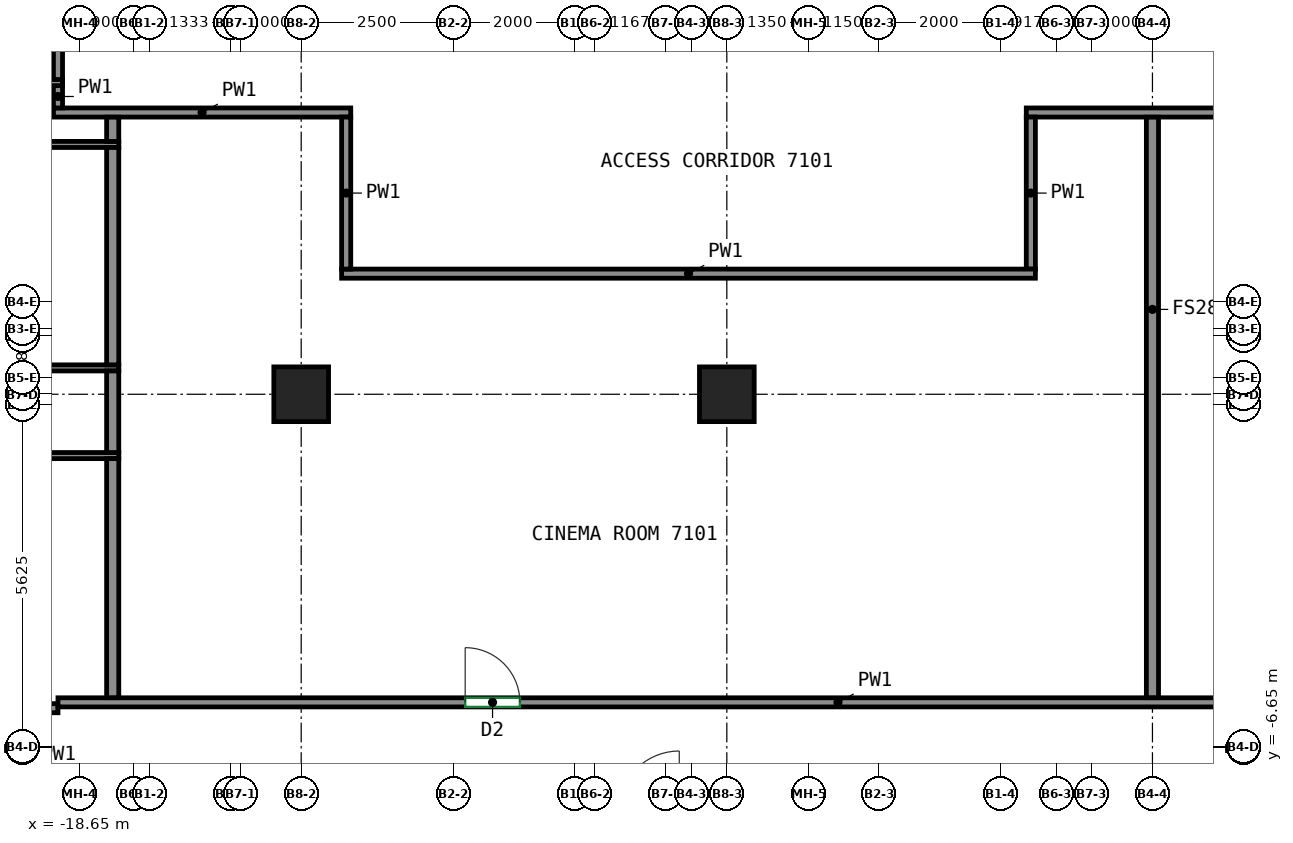
"""IFC4 building model, lengths in metres.
Left out: names, types, materials, properties, quantities, classifications, styles, units other than length and angle.
Written with IfcOpenShell. Run it as: python <this file> out.ifc"""

import sys

from ifc_helpers import new_model, si_unit, direction, frame, frame_2d, origin, origin_2d, place, context, subcontext, project, spatial, rectangle, extrude, source, transform, mapped, element, fill, save


model = new_model("IFC4")
c1 = context("Model", 3, precision=1e-05, world=origin(), true_north=direction((0.0, 1.0)))
c2 = subcontext(c1, "Body", "Model", "MODEL_VIEW")
j1 = project(units=[si_unit("LENGTHUNIT", "METRE"), si_unit("PLANEANGLEUNIT", "RADIAN")], contexts=[c1])
p1 = place(None, origin())
s1 = spatial("IfcSite", under=j1, at=p1, CompositionType="ELEMENT")
p2 = place(p1, origin())
s2 = spatial("IfcBuilding", under=s1, at=p2, CompositionType="ELEMENT")
p3 = place(p2, frame((0.0, 0.0, 287.4)))
s3 = spatial("IfcBuildingStorey", under=s2, at=p3, CompositionType="ELEMENT", Elevation=287.4)
m1 = source(origin(), c2, "Body", "SweptSolid", [
    extrude(rectangle(XDim=0.9, YDim=0.9, at=origin_2d()), origin(), (0.0, 0.0, 1.0), 3.0),
])
for number, where, z_axis, x_axis in (
    (1, (-15.0, -0.833, 0.0), (0.0, 0.0, 1.0), (1.0, 0.0, 0.0)),
    (2, (-8.0, -0.833, 0.0), (0.0, 0.0, 1.0), (1.0, 0.0, 0.0)),
):
    element("IfcColumn", number, at=place(p3, frame(where, z_axis=z_axis, x_axis=x_axis)), inside=s3, PredefinedType="COLUMN", context=c2, shape_type="MappedRepresentation", body=[
        mapped(m1, transform((0.0, 0.0, 0.0))),
    ])
p4 = place(p3, frame((-19.0, -5.996, 0.0), z_axis=(0.0, 0.0, 1.0), x_axis=(-1.0, 0.0, 0.0)))
e3 = element("IfcWall", 3, at=p4, inside=s3, PredefinedType="PARTITIONING", context=c2, shape_type="SweptSolid", body=[
    extrude(rectangle(XDim=0.677, YDim=0.15, at=frame_2d((0.338, 0.0))), origin(), (0.0, 0.0, 1.0), 3.0),
])
p5 = place(p3, frame((-19.0, -5.9, 0.0), z_axis=(0.0, 0.0, 1.0), x_axis=(1.0, 0.0, 0.0)))
e4 = element("IfcWall", 4, at=p5, inside=s3, PredefinedType="PARTITIONING", context=c2, shape_type="SweptSolid", body=[
    extrude(rectangle(XDim=25.655, YDim=0.15, at=frame_2d((12.828, 0.0))), origin(), (0.0, 0.0, 1.0), 3.0),
])
p6 = place(p5, frame((6.697, 0.0, 0.0)))
e5 = element("IfcOpeningElement", 5, at=p6, cuts=e4, PredefinedType="OPENING", context=c2, shape_type="SweptSolid", body=[
    extrude(rectangle(XDim=0.9, YDim=2.1, at=frame_2d((0.45, 1.05))), frame((0.0, 0.085, 0.0), z_axis=(0.0, -1.0, 0.0), x_axis=(1.0, 0.0, 0.0)), (0.0, 0.0, 1.0), 0.17),
])
p7 = place(p3, frame((-19.075, 3.8, 0.0), z_axis=(0.0, 0.0, 1.0), x_axis=(1.0, 0.0, 0.0)))
e6 = element("IfcWall", 6, at=p7, inside=s3, PredefinedType="PARTITIONING", context=c2, shape_type="SweptSolid", body=[
    extrude(rectangle(XDim=4.89, YDim=0.15, at=frame_2d((2.445, 0.0))), origin(), (0.0, 0.0, 1.0), 3.0),
])
p8 = place(p3, frame((-19.0, 3.875, 0.0), z_axis=(0.0, 0.0, 1.0), x_axis=(0.0, 1.0, 0.0)))
e7 = element("IfcWall", 7, at=p8, inside=s3, PredefinedType="PARTITIONING", context=c2, shape_type="SweptSolid", body=[
    extrude(rectangle(XDim=0.377, YDim=0.15, at=frame_2d((0.188, 0.0))), origin(), (0.0, 0.0, 1.0), 3.0),
])
p9 = place(p3, frame((-19.0, 4.332, 0.0), z_axis=(0.0, 0.0, 1.0), x_axis=(0.0, 1.0, 0.0)))
e8 = element("IfcWall", 8, at=p9, inside=s3, PredefinedType="PARTITIONING", context=c2, shape_type="SweptSolid", body=[
    extrude(rectangle(XDim=3.578, YDim=0.15, at=frame_2d((1.789, 0.0))), origin(), (0.0, 0.0, 1.0), 3.0),
])
p10 = place(p3, frame((-3.075, 3.8, 0.0), z_axis=(0.0, 0.0, 1.0), x_axis=(1.0, 0.0, 0.0)))
e9 = element("IfcWall", 9, at=p10, inside=s3, PredefinedType="PARTITIONING", context=c2, shape_type="SweptSolid", body=[
    extrude(rectangle(XDim=9.73, YDim=0.15, at=frame_2d((4.865, 0.0))), origin(), (0.0, 0.0, 1.0), 3.0),
])
p11 = place(p3, frame((-3.0, 1.225, 0.0), z_axis=(0.0, 0.0, 1.0), x_axis=(0.0, 1.0, 0.0)))
e10 = element("IfcWall", 10, at=p11, inside=s3, PredefinedType="PARTITIONING", context=c2, shape_type="SweptSolid", body=[
    extrude(rectangle(XDim=2.5, YDim=0.15, at=frame_2d((1.25, 0.0))), origin(), (0.0, 0.0, 1.0), 3.0),
])
p12 = place(p3, frame((-14.335, 1.15, 0.0), z_axis=(0.0, 0.0, 1.0), x_axis=(1.0, 0.0, 0.0)))
e11 = element("IfcWall", 11, at=p12, inside=s3, PredefinedType="PARTITIONING", context=c2, shape_type="SweptSolid", body=[
    extrude(rectangle(XDim=11.41, YDim=0.15, at=frame_2d((5.705, 0.0))), origin(), (0.0, 0.0, 1.0), 3.0),
])
p13 = place(p3, frame((-14.26, 3.725, 0.0), z_axis=(0.0, 0.0, 1.0), x_axis=(0.0, -1.0, 0.0)))
e12 = element("IfcWall", 12, at=p13, inside=s3, PredefinedType="PARTITIONING", context=c2, shape_type="SweptSolid", body=[
    extrude(rectangle(XDim=2.5, YDim=0.15, at=frame_2d((1.25, 0.0))), origin(), (0.0, 0.0, 1.0), 3.0),
])
p14 = place(p3, frame((-18.0, -1.842, 0.0), z_axis=(0.0, 0.0, 1.0), x_axis=(-1.0, 0.0, 0.0)))
e13 = element("IfcWall", 13, at=p14, inside=s3, PredefinedType="PARTITIONING", context=c2, shape_type="SweptSolid", body=[
    extrude(rectangle(XDim=7.25, YDim=0.1, at=frame_2d((3.625, 0.0))), origin(), (0.0, 0.0, 1.0), 3.0),
])
p15 = place(p14, frame((3.629, 0.0, 0.0)))
e14 = element("IfcOpeningElement", 14, at=p15, cuts=e13, PredefinedType="OPENING", context=c2, shape_type="SweptSolid", body=[
    extrude(rectangle(XDim=0.9, YDim=2.1, at=frame_2d((0.45, 1.05))), frame((0.0, 0.06, 0.0), z_axis=(0.0, -1.0, 0.0), x_axis=(1.0, 0.0, 0.0)), (0.0, 0.0, 1.0), 0.12),
])
p16 = place(p3, frame((-18.1, -5.823, 0.0), z_axis=(0.0, 0.0, 1.0), x_axis=(0.0, 1.0, 0.0)))
e15 = element("IfcWall", 15, at=p16, inside=s3, PredefinedType="PARTITIONING", context=c2, shape_type="SweptSolid", body=[
    extrude(rectangle(XDim=3.931, YDim=0.2, at=frame_2d((1.965, 0.0))), origin(), (0.0, 0.0, 1.0), 3.0),
])
p17 = place(p3, frame((-18.0, -0.4, 0.0), z_axis=(0.0, 0.0, 1.0), x_axis=(-1.0, 0.0, 0.0)))
e16 = element("IfcWall", 16, at=p17, inside=s3, PredefinedType="PARTITIONING", context=c2, shape_type="SweptSolid", body=[
    extrude(rectangle(XDim=7.25, YDim=0.1, at=frame_2d((3.625, 0.0))), origin(), (0.0, 0.0, 1.0), 3.0),
])
p18 = place(p17, frame((5.647, 0.0, 0.0)))
e17 = element("IfcOpeningElement", 17, at=p18, cuts=e16, PredefinedType="OPENING", context=c2, shape_type="SweptSolid", body=[
    extrude(rectangle(XDim=1.0, YDim=2.1, at=frame_2d((0.5, 1.05))), frame((0.0, 0.06, 0.0), z_axis=(0.0, -1.0, 0.0), x_axis=(1.0, 0.0, 0.0)), (0.0, 0.0, 1.0), 0.12),
])
p19 = place(p3, frame((-18.1, -1.792, 0.0), z_axis=(0.0, 0.0, 1.0), x_axis=(0.0, 1.0, 0.0)))
e18 = element("IfcWall", 18, at=p19, inside=s3, PredefinedType="PARTITIONING", context=c2, shape_type="SweptSolid", body=[
    extrude(rectangle(XDim=1.342, YDim=0.2, at=frame_2d((0.671, 0.0))), origin(), (0.0, 0.0, 1.0), 3.0),
])
p20 = place(p3, frame((-18.0, 3.275, 0.0), z_axis=(0.0, 0.0, 1.0), x_axis=(-1.0, 0.0, 0.0)))
e19 = element("IfcWall", 19, at=p20, inside=s3, PredefinedType="PARTITIONING", context=c2, shape_type="SweptSolid", body=[
    extrude(rectangle(XDim=7.25, YDim=0.1, at=frame_2d((3.625, 0.0))), origin(), (0.0, 0.0, 1.0), 3.0),
])
p21 = place(p20, frame((2.116, 0.0, 0.0)))
e20 = element("IfcOpeningElement", 20, at=p21, cuts=e19, PredefinedType="OPENING", context=c2, shape_type="SweptSolid", body=[
    extrude(rectangle(XDim=0.9, YDim=2.1, at=frame_2d((0.45, 1.05))), frame((0.0, 0.06, 0.0), z_axis=(0.0, -1.0, 0.0), x_axis=(1.0, 0.0, 0.0)), (0.0, 0.0, 1.0), 0.12),
])
p22 = place(p3, frame((-18.1, -0.35, 0.0), z_axis=(0.0, 0.0, 1.0), x_axis=(0.0, 1.0, 0.0)))
e21 = element("IfcWall", 21, at=p22, inside=s3, PredefinedType="PARTITIONING", context=c2, shape_type="SweptSolid", body=[
    extrude(rectangle(XDim=3.575, YDim=0.2, at=frame_2d((1.788, 0.0))), origin(), (0.0, 0.0, 1.0), 3.0),
])
p23 = place(p3, frame((-18.927, 4.292, 0.0), z_axis=(0.0, 0.0, 1.0), x_axis=(-1.0, 0.0, 0.0)))
e22 = element("IfcWall", 22, at=p23, inside=s3, PredefinedType="PARTITIONING", context=c2, shape_type="SweptSolid", body=[
    extrude(rectangle(XDim=6.323, YDim=0.1, at=frame_2d((3.162, 0.0))), origin(), (0.0, 0.0, 1.0), 3.0),
])
p24 = place(p23, frame((4.319, 0.0, 0.0)))
e23 = element("IfcOpeningElement", 23, at=p24, cuts=e22, PredefinedType="OPENING", context=c2, shape_type="SweptSolid", body=[
    extrude(rectangle(XDim=0.9, YDim=2.1, at=frame_2d((0.45, 1.05))), frame((0.0, 0.06, 0.0), z_axis=(0.0, -1.0, 0.0), x_axis=(1.0, 0.0, 0.0)), (0.0, 0.0, 1.0), 0.12),
])
p25 = place(p3, frame((-18.1, 3.325, 0.0), z_axis=(0.0, 0.0, 1.0), x_axis=(0.0, 1.0, 0.0)))
e24 = element("IfcWall", 24, at=p25, inside=s3, PredefinedType="PARTITIONING", context=c2, shape_type="SweptSolid", body=[
    extrude(rectangle(XDim=0.398, YDim=0.2, at=frame_2d((0.199, 0.0))), origin(), (0.0, 0.0, 1.0), 3.0),
])
p26 = place(p3, frame((-1.0, -5.823, 0.0), z_axis=(0.0, 0.0, 1.0), x_axis=(0.0, 1.0, 0.0)))
e25 = element("IfcWall", 25, at=p26, inside=s3, PredefinedType="PARTITIONING", context=c2, shape_type="SweptSolid", body=[
    extrude(rectangle(XDim=9.546, YDim=0.2, at=frame_2d((4.773, 0.0))), origin(), (0.0, 0.0, 1.0), 3.0),
])
p27 = place(p6, origin())
e26 = element("IfcDoor", 26, at=p27, inside=s3, OperationType="SINGLE_SWING_LEFT", PredefinedType="DOOR", context=c2, shape_type="SweptSolid", body=[
    extrude(rectangle(XDim=0.9, YDim=2.1, at=frame_2d((0.45, 1.05))), frame((0.0, 0.025, 0.0), z_axis=(0.0, -1.0, 0.0), x_axis=(1.0, 0.0, 0.0)), (0.0, 0.0, 1.0), 0.05),
])
fill(e5, e26)
save(model, sys.argv[1])
